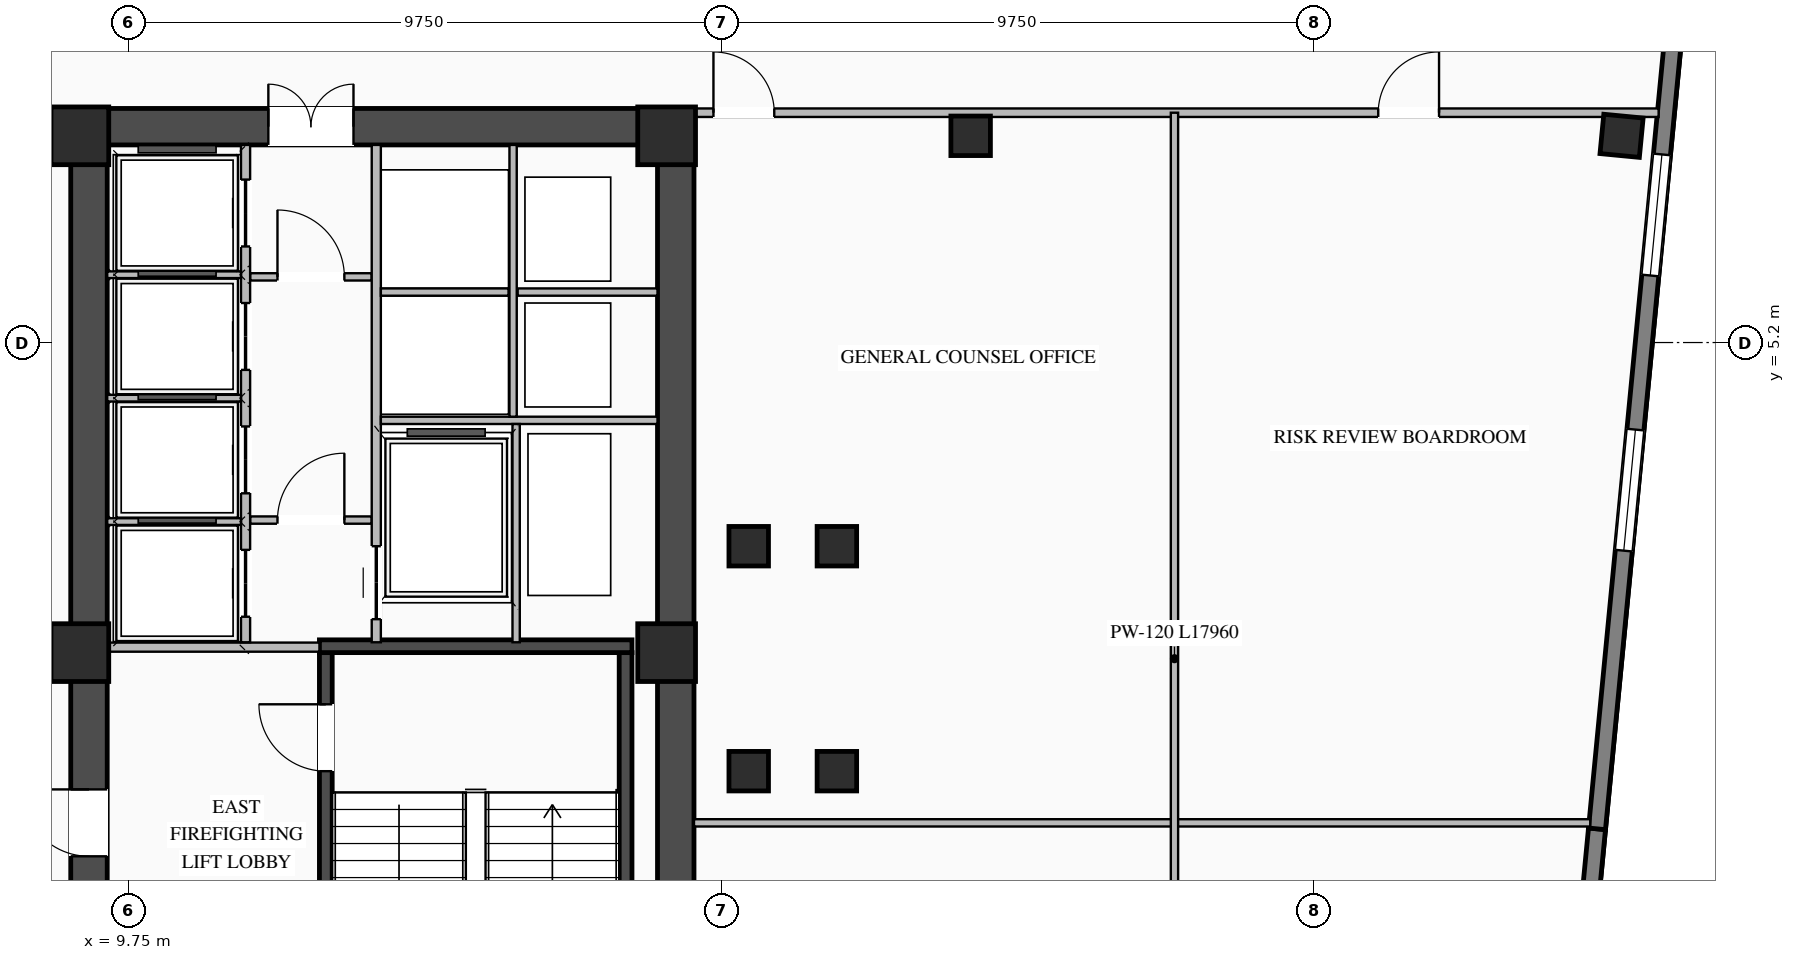
"""IFC4 building model, lengths in metres.
Left out: names, types, materials, properties, quantities, classifications, styles, units other than length and angle.
Written with IfcOpenShell. Run it as: python <this file> out.ifc"""

import sys

from ifc_helpers import new_model, si_unit, direction, frame, frame_2d, origin, origin_2d, place, context, subcontext, project, spatial, rectangle, i_section, extrude, element, fill, save


model = new_model("IFC4")
c1 = context("Model", 3, precision=1e-05, world=origin(), true_north=direction((0.0, 1.0)))
c2 = subcontext(c1, "Body", "Model", "MODEL_VIEW")
j1 = project(units=[si_unit("LENGTHUNIT", "METRE"), si_unit("PLANEANGLEUNIT", "RADIAN")], contexts=[c1])
p1 = place(None, origin())
s1 = spatial("IfcSite", under=j1, at=p1, CompositionType="ELEMENT")
p2 = place(p1, origin())
s2 = spatial("IfcBuilding", under=s1, at=p2, CompositionType="ELEMENT")
p3 = place(p2, frame((0.0, 0.0, 160.4)))
s3 = spatial("IfcBuildingStorey", under=s2, at=p3, CompositionType="ELEMENT", Elevation=160.4)
p4 = place(p3, frame((8.8, 8.75, 0.0), z_axis=(0.0, 0.0, 1.0), x_axis=(1.0, 0.0, 0.0)))
e1 = element("IfcWall", 1, at=p4, inside=s3, PredefinedType="SHEAR", context=c2, shape_type="SweptSolid", body=[
    extrude(rectangle(XDim=10.25, YDim=0.6, at=frame_2d((5.125, 0.0))), origin(), (0.0, 0.0, 1.0), 3.27),
])
p5 = place(p4, frame((3.25, 0.0, 0.0)))
e2 = element("IfcOpeningElement", 2, at=p5, cuts=e1, PredefinedType="OPENING", context=c2, shape_type="SweptSolid", body=[
    extrude(rectangle(XDim=1.4, YDim=2.05, at=frame_2d((0.7, 1.025))), frame((0.0, 0.31, 0.0), z_axis=(0.0, -1.0, 0.0), x_axis=(1.0, 0.0, 0.0)), (0.0, 0.0, 1.0), 0.62),
])
p6 = place(p3, frame((9.1, -8.45, 0.0), z_axis=(0.0, 0.0, 1.0), x_axis=(0.0, 1.0, 0.0)))
e3 = element("IfcWall", 3, at=p6, inside=s3, PredefinedType="SHEAR", context=c2, shape_type="SweptSolid", body=[
    extrude(rectangle(XDim=16.9, YDim=0.6, at=frame_2d((8.45, 0.0))), origin(), (0.0, 0.0, 1.0), 3.27),
])
p7 = place(p6, frame((5.2, 0.0, 0.0)))
e4 = element("IfcOpeningElement", 4, at=p7, cuts=e3, PredefinedType="OPENING", context=c2, shape_type="SweptSolid", body=[
    extrude(rectangle(XDim=1.1, YDim=2.08, at=frame_2d((0.55, 1.04))), frame((0.0, 0.31, 0.0), z_axis=(0.0, -1.0, 0.0), x_axis=(1.0, 0.0, 0.0)), (0.0, 0.0, 1.0), 0.62),
])
p8 = place(p3, frame((18.75, -8.45, 0.0), z_axis=(0.0, 0.0, 1.0), x_axis=(0.0, 1.0, 0.0)))
e5 = element("IfcWall", 5, at=p8, inside=s3, PredefinedType="SHEAR", context=c2, shape_type="SweptSolid", body=[
    extrude(rectangle(XDim=16.9, YDim=0.6, at=frame_2d((8.45, 0.0))), origin(), (0.0, 0.0, 1.0), 3.27),
])
p9 = place(p3, frame((12.995, -8.1, 0.0), z_axis=(0.0, 0.0, 1.0), x_axis=(0.0, 1.0, 0.0)))
e6 = element("IfcWall", 6, at=p9, inside=s3, PredefinedType="SHEAR", context=c2, shape_type="SweptSolid", body=[
    extrude(rectangle(XDim=8.2, YDim=0.21, at=frame_2d((4.1, 0.0))), origin(), (0.0, 0.0, 1.0), 3.27),
])
p10 = place(p9, frame((6.25, 0.0, 0.0)))
e7 = element("IfcOpeningElement", 7, at=p10, cuts=e6, PredefinedType="OPENING", context=c2, shape_type="SweptSolid", body=[
    extrude(rectangle(XDim=1.1, YDim=2.15, at=frame_2d((0.55, 1.075))), frame((0.0, 0.115, 0.0), z_axis=(0.0, -1.0, 0.0), x_axis=(1.0, 0.0, 0.0)), (0.0, 0.0, 1.0), 0.23),
])
p11 = place(p3, frame((17.925, -8.1, 0.0), z_axis=(0.0, 0.0, 1.0), x_axis=(0.0, 1.0, 0.0)))
e8 = element("IfcWall", 8, at=p11, inside=s3, PredefinedType="SHEAR", context=c2, shape_type="SweptSolid", body=[
    extrude(rectangle(XDim=8.2, YDim=0.21, at=frame_2d((4.1, 0.0))), origin(), (0.0, 0.0, 1.0), 3.27),
])
p12 = place(p3, frame((18.03, 0.205, 0.0), z_axis=(0.0, 0.0, 1.0), x_axis=(-1.0, 0.0, 0.0)))
e9 = element("IfcWall", 9, at=p12, inside=s3, PredefinedType="SHEAR", context=c2, shape_type="SweptSolid", body=[
    extrude(rectangle(XDim=5.14, YDim=0.21, at=frame_2d((2.57, 0.0))), origin(), (0.0, 0.0, 1.0), 3.27),
])
for number, where, z_axis, x_axis in (
    (10, (8.95, 0.1, 0.0), (0.0, 0.0, 1.0), (1.0, 0.0, 0.0)),
    (11, (8.95, 8.6, 0.0), (0.0, 0.0, 1.0), (1.0, 0.0, 0.0)),
    (12, (18.6, 0.1, 0.0), (0.0, 0.0, 1.0), (1.0, 0.0, 0.0)),
    (13, (18.6, 8.6, 0.0), (0.0, 0.0, 1.0), (1.0, 0.0, 0.0)),
):
    element("IfcColumn", number, at=place(p3, frame(where, z_axis=z_axis, x_axis=x_axis)), inside=s3, PredefinedType="COLUMN", context=c2, shape_type="SweptSolid", body=[
        extrude(rectangle(XDim=0.95, YDim=0.95, at=origin_2d()), origin(), (0.0, 0.0, 1.0), 3.45),
    ])
for number, where, z_axis, x_axis in (
    (14, (19.95, -1.85, 0.0), (0.0, 0.0, 1.0), (1.0, 0.0, 0.0)),
    (15, (19.95, 1.85, 0.0), (0.0, 0.0, 1.0), (1.0, 0.0, 0.0)),
    (16, (21.4, -1.85, 0.0), (0.0, 0.0, 1.0), (1.0, 0.0, 0.0)),
    (17, (21.4, 1.85, 0.0), (0.0, 0.0, 1.0), (1.0, 0.0, 0.0)),
    (18, (23.6, 8.6, 0.0), (0.0, 0.0, 1.0), (1.0, 0.0, 0.0)),
    (19, (34.305, 8.6, 0.0), (0.0, 0.0, 1.0), (0.995, -0.096, 0.0)),
):
    element("IfcColumn", number, at=place(p3, frame(where, z_axis=z_axis, x_axis=x_axis)), inside=s3, PredefinedType="COLUMN", context=c2, shape_type="SweptSolid", body=[
        extrude(i_section(OverallWidth=0.65, OverallDepth=0.65, WebThickness=0.028, FlangeThickness=0.04, at=origin_2d()), origin(), (0.0, 0.0, 1.0), 3.45),
    ])
p13 = place(p3, frame((33.901, -2.798, 0.0), z_axis=(0.0, 0.0, 1.0), x_axis=(-0.095853434568, -0.99539545864, 0.0)))
e20 = element("IfcWall", 20, at=p13, inside=s3, PredefinedType="STANDARD", context=c2, shape_type="SweptSolid", body=[
    extrude(rectangle(XDim=16.79, YDim=0.28, at=frame_2d((8.395, 0.0))), origin(), (0.0, 0.0, 1.0), 3.25),
])
p14 = place(p13, frame((3.547, 0.0, 0.76)))
e21 = element("IfcOpeningElement", 21, at=p14, cuts=e20, PredefinedType="OPENING", context=c2, shape_type="SweptSolid", body=[
    extrude(rectangle(XDim=2.0, YDim=2.05, at=frame_2d((1.0, 1.025))), frame((0.0, 0.15, 0.0), z_axis=(0.0, -1.0, 0.0), x_axis=(1.0, 0.0, 0.0)), (0.0, 0.0, 1.0), 0.3),
])
p15 = place(p13, frame((10.193, 0.0, 0.76)))
e22 = element("IfcOpeningElement", 22, at=p15, cuts=e20, PredefinedType="OPENING", context=c2, shape_type="SweptSolid", body=[
    extrude(rectangle(XDim=2.0, YDim=2.05, at=frame_2d((1.0, 1.025))), frame((0.0, 0.15, 0.0), z_axis=(0.0, -1.0, 0.0), x_axis=(1.0, 0.0, 0.0)), (0.0, 0.0, 1.0), 0.3),
])
p16 = place(p3, frame((35.51, 13.914, 0.0), z_axis=(0.0, 0.0, 1.0), x_axis=(-0.095839027265, -0.995396845913, 0.0)))
e23 = element("IfcWall", 23, at=p16, inside=s3, PredefinedType="STANDARD", context=c2, shape_type="SweptSolid", body=[
    extrude(rectangle(XDim=16.79, YDim=0.28, at=frame_2d((8.395, 0.0))), origin(), (0.0, 0.0, 1.0), 3.25),
])
p17 = place(p16, frame((5.647, 0.0, 0.76)))
e24 = element("IfcOpeningElement", 24, at=p17, cuts=e23, PredefinedType="OPENING", context=c2, shape_type="SweptSolid", body=[
    extrude(rectangle(XDim=2.0, YDim=2.05, at=frame_2d((1.0, 1.025))), frame((0.0, 0.15, 0.0), z_axis=(0.0, -1.0, 0.0), x_axis=(1.0, 0.0, 0.0)), (0.0, 0.0, 1.0), 0.3),
])
p18 = place(p16, frame((10.193, 0.0, 0.76)))
e25 = element("IfcOpeningElement", 25, at=p18, cuts=e23, PredefinedType="OPENING", context=c2, shape_type="SweptSolid", body=[
    extrude(rectangle(XDim=2.0, YDim=2.05, at=frame_2d((1.0, 1.025))), frame((0.0, 0.15, 0.0), z_axis=(0.0, -1.0, 0.0), x_axis=(1.0, 0.0, 0.0)), (0.0, 0.0, 1.0), 0.3),
])
p19 = place(p3, frame((9.4, 0.19, 0.0), z_axis=(0.0, 0.0, 1.0), x_axis=(1.0, 0.0, 0.0)))
e26 = element("IfcWall", 26, at=p19, inside=s3, PredefinedType="STANDARD", context=c2, shape_type="SweptSolid", body=[
    extrude(rectangle(XDim=3.49, YDim=0.15, at=frame_2d((1.745, 0.0))), origin(), (0.0, 0.0, 1.0), 2.645),
])
p20 = place(p3, frame((11.75, 2.28, 0.0), z_axis=(0.0, 0.0, 1.0), x_axis=(1.0, 0.0, 0.0)))
e27 = element("IfcWall", 27, at=p20, inside=s3, PredefinedType="STANDARD", context=c2, shape_type="SweptSolid", body=[
    extrude(rectangle(XDim=2.0, YDim=0.12, at=frame_2d((1.0, 0.0))), origin(), (0.0, 0.0, 1.0), 3.25),
])
p21 = place(p20, frame((0.45, 0.0, 0.0)))
e28 = element("IfcOpeningElement", 28, at=p21, cuts=e27, PredefinedType="OPENING", context=c2, shape_type="SweptSolid", body=[
    extrude(rectangle(XDim=1.1, YDim=2.1, at=frame_2d((0.55, 1.05))), frame((0.0, 0.07, 0.0), z_axis=(0.0, -1.0, 0.0), x_axis=(1.0, 0.0, 0.0)), (0.0, 0.0, 1.0), 0.14),
])
p22 = place(p3, frame((11.75, 6.28, 0.0), z_axis=(0.0, 0.0, 1.0), x_axis=(1.0, 0.0, 0.0)))
e29 = element("IfcWall", 29, at=p22, inside=s3, PredefinedType="STANDARD", context=c2, shape_type="SweptSolid", body=[
    extrude(rectangle(XDim=2.0, YDim=0.12, at=frame_2d((1.0, 0.0))), origin(), (0.0, 0.0, 1.0), 3.25),
])
p23 = place(p22, frame((0.45, 0.0, 0.0)))
e30 = element("IfcOpeningElement", 30, at=p23, cuts=e29, PredefinedType="OPENING", context=c2, shape_type="SweptSolid", body=[
    extrude(rectangle(XDim=1.1, YDim=2.1, at=frame_2d((0.55, 1.05))), frame((0.0, 0.07, 0.0), z_axis=(0.0, -1.0, 0.0), x_axis=(1.0, 0.0, 0.0)), (0.0, 0.0, 1.0), 0.14),
])
p24 = place(p3, frame((11.675, 0.27, 0.0), z_axis=(0.0, 0.0, 1.0), x_axis=(0.0, 1.0, 0.0)))
e31 = element("IfcWall", 31, at=p24, inside=s3, PredefinedType="STANDARD", context=c2, shape_type="SweptSolid", body=[
    extrude(rectangle(XDim=8.18, YDim=0.15, at=frame_2d((4.09, 0.0))), origin(), (0.0, 0.0, 1.0), 3.25),
])
p25 = place(p24, frame((0.42, 0.0, 0.0)))
e32 = element("IfcOpeningElement", 32, at=p25, cuts=e31, PredefinedType="OPENING", context=c2, shape_type="SweptSolid", body=[
    extrude(rectangle(XDim=1.1, YDim=2.1, at=frame_2d((0.55, 1.05))), frame((0.0, 0.085, 0.0), z_axis=(0.0, -1.0, 0.0), x_axis=(1.0, 0.0, 0.0)), (0.0, 0.0, 1.0), 0.17),
])
p26 = place(p24, frame((2.45, 0.0, 0.0)))
e33 = element("IfcOpeningElement", 33, at=p26, cuts=e31, PredefinedType="OPENING", context=c2, shape_type="SweptSolid", body=[
    extrude(rectangle(XDim=1.1, YDim=2.1, at=frame_2d((0.55, 1.05))), frame((0.0, 0.085, 0.0), z_axis=(0.0, -1.0, 0.0), x_axis=(1.0, 0.0, 0.0)), (0.0, 0.0, 1.0), 0.17),
])
p27 = place(p24, frame((4.48, 0.0, 0.0)))
e34 = element("IfcOpeningElement", 34, at=p27, cuts=e31, PredefinedType="OPENING", context=c2, shape_type="SweptSolid", body=[
    extrude(rectangle(XDim=1.1, YDim=2.1, at=frame_2d((0.55, 1.05))), frame((0.0, 0.085, 0.0), z_axis=(0.0, -1.0, 0.0), x_axis=(1.0, 0.0, 0.0)), (0.0, 0.0, 1.0), 0.17),
])
p28 = place(p24, frame((6.51, 0.0, 0.0)))
e35 = element("IfcOpeningElement", 35, at=p28, cuts=e31, PredefinedType="OPENING", context=c2, shape_type="SweptSolid", body=[
    extrude(rectangle(XDim=1.1, YDim=2.1, at=frame_2d((0.55, 1.05))), frame((0.0, 0.085, 0.0), z_axis=(0.0, -1.0, 0.0), x_axis=(1.0, 0.0, 0.0)), (0.0, 0.0, 1.0), 0.17),
])
for number, where, z_axis, x_axis in (
    (36, (9.4, 2.255, 0.0), (0.0, 0.0, 1.0), (1.0, 0.0, 0.0)),
    (37, (9.4, 4.285, 0.0), (0.0, 0.0, 1.0), (1.0, 0.0, 0.0)),
    (38, (9.4, 6.315, 0.0), (0.0, 0.0, 1.0), (1.0, 0.0, 0.0)),
):
    element("IfcWall", number, at=place(p3, frame(where, z_axis=z_axis, x_axis=x_axis)), inside=s3, PredefinedType="STANDARD", context=c2, shape_type="SweptSolid", body=[
        extrude(rectangle(XDim=2.2, YDim=0.11, at=frame_2d((1.1, 0.0))), origin(), (0.0, 0.0, 1.0), 3.25),
    ])
p29 = place(p3, frame((13.825, 0.27, 0.0), z_axis=(0.0, 0.0, 1.0), x_axis=(0.0, 1.0, 0.0)))
e39 = element("IfcWall", 39, at=p29, inside=s3, PredefinedType="STANDARD", context=c2, shape_type="SweptSolid", body=[
    extrude(rectangle(XDim=8.18, YDim=0.15, at=frame_2d((4.09, 0.0))), origin(), (0.0, 0.0, 1.0), 3.25),
])
p30 = place(p29, frame((0.38, 0.0, 0.0)))
e40 = element("IfcOpeningElement", 40, at=p30, cuts=e39, PredefinedType="OPENING", context=c2, shape_type="SweptSolid", body=[
    extrude(rectangle(XDim=1.2, YDim=2.1, at=frame_2d((0.6, 1.05))), frame((0.0, 0.085, 0.0), z_axis=(0.0, -1.0, 0.0), x_axis=(1.0, 0.0, 0.0)), (0.0, 0.0, 1.0), 0.17),
])
p31 = place(p3, frame((13.9, 3.92, 0.0), z_axis=(0.0, 0.0, 1.0), x_axis=(1.0, 0.0, 0.0)))
e41 = element("IfcWall", 41, at=p31, inside=s3, PredefinedType="STANDARD", context=c2, shape_type="SweptSolid", body=[
    extrude(rectangle(XDim=4.55, YDim=0.12, at=frame_2d((2.275, 0.0))), origin(), (0.0, 0.0, 1.0), 3.25),
])
p32 = place(p3, frame((16.15, 6.03, 0.0), z_axis=(0.0, 0.0, 1.0), x_axis=(1.0, 0.0, 0.0)))
e42 = element("IfcWall", 42, at=p32, inside=s3, PredefinedType="STANDARD", context=c2, shape_type="SweptSolid", body=[
    extrude(rectangle(XDim=2.3, YDim=0.12, at=frame_2d((1.15, 0.0))), origin(), (0.0, 0.0, 1.0), 3.25),
])
p33 = place(p3, frame((16.075, 3.98, 0.0), z_axis=(0.0, 0.0, 1.0), x_axis=(0.0, 1.0, 0.0)))
e43 = element("IfcWall", 43, at=p33, inside=s3, PredefinedType="STANDARD", context=c2, shape_type="SweptSolid", body=[
    extrude(rectangle(XDim=4.47, YDim=0.12, at=frame_2d((2.235, 0.0))), origin(), (0.0, 0.0, 1.0), 3.25),
])
p34 = place(p3, frame((13.9, 6.03, 0.0), z_axis=(0.0, 0.0, 1.0), x_axis=(1.0, 0.0, 0.0)))
e44 = element("IfcWall", 44, at=p34, inside=s3, PredefinedType="STANDARD", context=c2, shape_type="SweptSolid", body=[
    extrude(rectangle(XDim=2.1, YDim=0.12, at=frame_2d((1.05, 0.0))), origin(), (0.0, 0.0, 1.0), 3.25),
])
p35 = place(p3, frame((16.125, 0.27, 0.0), z_axis=(0.0, 0.0, 1.0), x_axis=(0.0, 1.0, 0.0)))
e45 = element("IfcWall", 45, at=p35, inside=s3, PredefinedType="STANDARD", context=c2, shape_type="SweptSolid", body=[
    extrude(rectangle(XDim=3.59, YDim=0.12, at=frame_2d((1.795, 0.0))), origin(), (0.0, 0.0, 1.0), 3.25),
])
p36 = place(p3, frame((19.05, 8.98, 0.0), z_axis=(0.0, 0.0, 1.0), x_axis=(1.0, 0.0, 0.0)))
e46 = element("IfcWall", 46, at=p36, inside=s3, PredefinedType="STANDARD", context=c2, shape_type="SweptSolid", body=[
    extrude(rectangle(XDim=15.864, YDim=0.14, at=frame_2d((7.932, 0.0))), origin(), (0.0, 0.0, 1.0), 3.25),
])
p37 = place(p36, frame((0.32, 0.0, 0.0)))
e47 = element("IfcOpeningElement", 47, at=p37, cuts=e46, PredefinedType="OPENING", context=c2, shape_type="SweptSolid", body=[
    extrude(rectangle(XDim=1.0, YDim=2.08, at=frame_2d((0.5, 1.04))), frame((0.0, 0.08, 0.0), z_axis=(0.0, -1.0, 0.0), x_axis=(1.0, 0.0, 0.0)), (0.0, 0.0, 1.0), 0.16),
])
p38 = place(p36, frame((11.253, 0.0, 0.0)))
e48 = element("IfcOpeningElement", 48, at=p38, cuts=e46, PredefinedType="OPENING", context=c2, shape_type="SweptSolid", body=[
    extrude(rectangle(XDim=1.0, YDim=2.08, at=frame_2d((0.5, 1.04))), frame((0.0, 0.08, 0.0), z_axis=(0.0, -1.0, 0.0), x_axis=(1.0, 0.0, 0.0)), (0.0, 0.0, 1.0), 0.16),
])
p39 = place(p3, frame((19.05, -2.7, 0.0), z_axis=(0.0, 0.0, 1.0), x_axis=(1.0, 0.0, 0.0)))
e49 = element("IfcWall", 49, at=p39, inside=s3, PredefinedType="STANDARD", context=c2, shape_type="SweptSolid", body=[
    extrude(rectangle(XDim=14.74, YDim=0.12, at=frame_2d((7.37, 0.0))), origin(), (0.0, 0.0, 1.0), 3.25),
])
p40 = place(p3, frame((26.952, -8.98, 0.0), z_axis=(0.0, 0.0, 1.0), x_axis=(0.0, 1.0, 0.0)))
e50 = element("IfcWall", 50, at=p40, inside=s3, PredefinedType="STANDARD", context=c2, shape_type="SweptSolid", body=[
    extrude(rectangle(XDim=17.96, YDim=0.12, at=frame_2d((8.98, 0.0))), origin(), (0.0, 0.0, 1.0), 3.25),
])
p41 = place(p17, origin())
e51 = element("IfcWindow", 51, at=p41, inside=s3, PartitioningType="DOUBLE_PANEL_VERTICAL", PredefinedType="WINDOW", context=c2, shape_type="SweptSolid", body=[
    extrude(rectangle(XDim=2.0, YDim=2.05, at=frame_2d((1.0, 1.025))), frame((0.0, 0.03, 0.0), z_axis=(0.0, -1.0, 0.0), x_axis=(1.0, 0.0, 0.0)), (0.0, 0.0, 1.0), 0.06),
])
fill(e24, e51)
p42 = place(p18, origin())
e52 = element("IfcWindow", 52, at=p42, inside=s3, PartitioningType="DOUBLE_PANEL_VERTICAL", PredefinedType="WINDOW", context=c2, shape_type="SweptSolid", body=[
    extrude(rectangle(XDim=2.0, YDim=2.05, at=frame_2d((1.0, 1.025))), frame((0.0, 0.03, 0.0), z_axis=(0.0, -1.0, 0.0), x_axis=(1.0, 0.0, 0.0)), (0.0, 0.0, 1.0), 0.06),
])
fill(e25, e52)
p43 = place(p10, origin())
e53 = element("IfcDoor", 53, at=p43, inside=s3, OperationType="SINGLE_SWING_RIGHT", PredefinedType="DOOR", context=c2, shape_type="SweptSolid", body=[
    extrude(rectangle(XDim=1.1, YDim=2.15, at=frame_2d((0.55, 1.075))), frame((0.0, 0.025, 0.0), z_axis=(0.0, -1.0, 0.0), x_axis=(1.0, 0.0, 0.0)), (0.0, 0.0, 1.0), 0.05),
])
fill(e7, e53)
p44 = place(p7, origin())
e54 = element("IfcDoor", 54, at=p44, inside=s3, OperationType="SINGLE_SWING_RIGHT", PredefinedType="DOOR", context=c2, shape_type="SweptSolid", body=[
    extrude(rectangle(XDim=1.1, YDim=2.08, at=frame_2d((0.55, 1.04))), frame((0.0, -0.205, 0.0), z_axis=(0.0, -1.0, 0.0), x_axis=(1.0, 0.0, 0.0)), (0.0, 0.0, 1.0), 0.05),
])
fill(e4, e54)
p45 = place(p21, origin())
e55 = element("IfcDoor", 55, at=p45, inside=s3, OperationType="SINGLE_SWING_RIGHT", PredefinedType="DOOR", context=c2, shape_type="SweptSolid", body=[
    extrude(rectangle(XDim=1.1, YDim=2.1, at=frame_2d((0.55, 1.05))), frame((0.0, 0.025, 0.0), z_axis=(0.0, -1.0, 0.0), x_axis=(1.0, 0.0, 0.0)), (0.0, 0.0, 1.0), 0.05),
])
fill(e28, e55)
p46 = place(p23, origin())
e56 = element("IfcDoor", 56, at=p46, inside=s3, OperationType="SINGLE_SWING_LEFT", PredefinedType="DOOR", context=c2, shape_type="SweptSolid", body=[
    extrude(rectangle(XDim=1.1, YDim=2.1, at=frame_2d((0.55, 1.05))), frame((0.0, 0.025, 0.0), z_axis=(0.0, -1.0, 0.0), x_axis=(1.0, 0.0, 0.0)), (0.0, 0.0, 1.0), 0.05),
])
fill(e30, e56)
p47 = place(p5, origin())
e57 = element("IfcDoor", 57, at=p47, inside=s3, OperationType="DOUBLE_DOOR_SINGLE_SWING", PredefinedType="DOOR", context=c2, shape_type="SweptSolid", body=[
    extrude(rectangle(XDim=1.4, YDim=2.05, at=frame_2d((0.7, 1.025))), frame((0.0, 0.245, 0.0), z_axis=(0.0, -1.0, 0.0), x_axis=(1.0, 0.0, 0.0)), (0.0, 0.0, 1.0), 0.05),
])
fill(e2, e57)
p48 = place(p25, origin())
e58 = element("IfcDoor", 58, at=p48, inside=s3, OperationType="DOUBLE_DOOR_SLIDING", PredefinedType="DOOR", context=c2, shape_type="SweptSolid", body=[
    extrude(rectangle(XDim=1.1, YDim=2.1, at=frame_2d((0.55, 1.05))), frame((0.0, 0.025, 0.0), z_axis=(0.0, -1.0, 0.0), x_axis=(1.0, 0.0, 0.0)), (0.0, 0.0, 1.0), 0.05),
])
fill(e32, e58)
p49 = place(p26, origin())
e59 = element("IfcDoor", 59, at=p49, inside=s3, OperationType="DOUBLE_DOOR_SLIDING", PredefinedType="DOOR", context=c2, shape_type="SweptSolid", body=[
    extrude(rectangle(XDim=1.1, YDim=2.1, at=frame_2d((0.55, 1.05))), frame((0.0, 0.025, 0.0), z_axis=(0.0, -1.0, 0.0), x_axis=(1.0, 0.0, 0.0)), (0.0, 0.0, 1.0), 0.05),
])
fill(e33, e59)
p50 = place(p27, origin())
e60 = element("IfcDoor", 60, at=p50, inside=s3, OperationType="DOUBLE_DOOR_SLIDING", PredefinedType="DOOR", context=c2, shape_type="SweptSolid", body=[
    extrude(rectangle(XDim=1.1, YDim=2.1, at=frame_2d((0.55, 1.05))), frame((0.0, 0.025, 0.0), z_axis=(0.0, -1.0, 0.0), x_axis=(1.0, 0.0, 0.0)), (0.0, 0.0, 1.0), 0.05),
])
fill(e34, e60)
p51 = place(p28, origin())
e61 = element("IfcDoor", 61, at=p51, inside=s3, OperationType="DOUBLE_DOOR_SLIDING", PredefinedType="DOOR", context=c2, shape_type="SweptSolid", body=[
    extrude(rectangle(XDim=1.1, YDim=2.1, at=frame_2d((0.55, 1.05))), frame((0.0, 0.025, 0.0), z_axis=(0.0, -1.0, 0.0), x_axis=(1.0, 0.0, 0.0)), (0.0, 0.0, 1.0), 0.05),
])
fill(e35, e61)
p52 = place(p30, origin())
e62 = element("IfcDoor", 62, at=p52, inside=s3, OperationType="DOUBLE_DOOR_SLIDING", PredefinedType="DOOR", context=c2, shape_type="SweptSolid", body=[
    extrude(rectangle(XDim=1.2, YDim=2.1, at=frame_2d((0.6, 1.05))), frame((0.0, 0.025, 0.0), z_axis=(0.0, -1.0, 0.0), x_axis=(1.0, 0.0, 0.0)), (0.0, 0.0, 1.0), 0.05),
])
fill(e40, e62)
p53 = place(p37, origin())
e63 = element("IfcDoor", 63, at=p53, inside=s3, OperationType="SINGLE_SWING_LEFT", PredefinedType="DOOR", context=c2, shape_type="SweptSolid", body=[
    extrude(rectangle(XDim=1.0, YDim=2.08, at=frame_2d((0.5, 1.04))), frame((0.0, 0.025, 0.0), z_axis=(0.0, -1.0, 0.0), x_axis=(1.0, 0.0, 0.0)), (0.0, 0.0, 1.0), 0.05),
])
fill(e47, e63)
p54 = place(p38, origin())
e64 = element("IfcDoor", 64, at=p54, inside=s3, OperationType="SINGLE_SWING_RIGHT", PredefinedType="DOOR", context=c2, shape_type="SweptSolid", body=[
    extrude(rectangle(XDim=1.0, YDim=2.08, at=frame_2d((0.5, 1.04))), frame((0.0, 0.025, 0.0), z_axis=(0.0, -1.0, 0.0), x_axis=(1.0, 0.0, 0.0)), (0.0, 0.0, 1.0), 0.05),
])
fill(e48, e64)
save(model, sys.argv[1])
